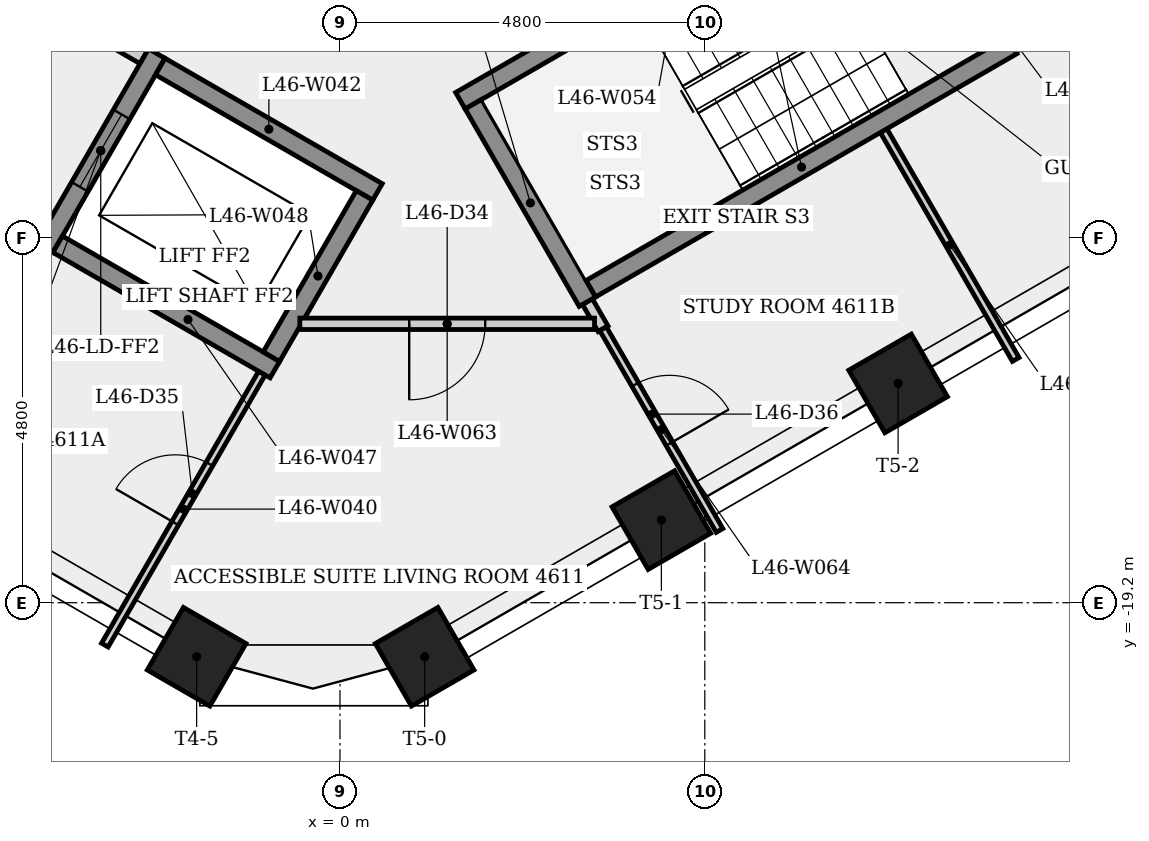
"""IFC4 building model, lengths in metres.
Left out: names, types, materials, properties, quantities, classifications, styles, units other than length and angle.
Written with IfcOpenShell. Run it as: python <this file> out.ifc"""

import sys

from ifc_helpers import new_model, si_unit, direction, frame, frame_2d, origin, origin_2d, place, context, subcontext, project, spatial, rectangle, extrude, element, fill, save


model = new_model("IFC4")
c1 = context("Model", 3, precision=1e-05, world=origin(), true_north=direction((0.0, 1.0)))
c2 = subcontext(c1, "Body", "Model", "MODEL_VIEW")
j1 = project(units=[si_unit("LENGTHUNIT", "METRE"), si_unit("PLANEANGLEUNIT", "RADIAN")], contexts=[c1])
p1 = place(None, origin())
s1 = spatial("IfcSite", under=j1, at=p1, CompositionType="ELEMENT")
p2 = place(p1, origin())
s2 = spatial("IfcBuilding", under=s1, at=p2, CompositionType="ELEMENT")
p3 = place(p2, frame((0.0, 0.0, 173.1)))
s3 = spatial("IfcBuildingStorey", under=s2, at=p3, CompositionType="ELEMENT", Elevation=173.1)
for number, where, z_axis, x_axis in (
    (1, (-1.886, -19.911, 0.0), (0.0, 0.0, 1.0), (-0.5, -0.866, 0.0)),
    (2, (1.114, -19.911, 0.0), (0.0, 0.0, 1.0), (0.5, -0.866, 0.0)),
    (3, (4.229, -18.113, 0.0), (0.0, 0.0, 1.0), (0.5, -0.866, 0.0)),
    (4, (7.343, -16.315, 0.0), (0.0, 0.0, 1.0), (0.5, -0.866, 0.0)),
):
    element("IfcColumn", number, at=place(p3, frame(where, z_axis=z_axis, x_axis=x_axis)), inside=s3, PredefinedType="COLUMN", context=c2, shape_type="SweptSolid", body=[
        extrude(rectangle(XDim=0.95, YDim=0.95, at=origin_2d()), origin(), (0.0, 0.0, 1.0), 3.4),
    ])
p4 = place(p3, frame((-6.435, -9.795, 0.0), z_axis=(0.0, 0.0, 1.0), x_axis=(0.866012907634, -0.500021643343, 0.0)))
e5 = element("IfcWall", 5, at=p4, inside=s3, PredefinedType="PARTITIONING", context=c2, shape_type="SweptSolid", body=[
    extrude(rectangle(XDim=4.45, YDim=0.2, at=frame_2d((2.225, 0.0))), origin(), (0.0, 0.0, 1.0), 3.05),
])
p5 = place(p4, frame((1.675, 0.0, 0.0)))
e6 = element("IfcOpeningElement", 6, at=p5, cuts=e5, PredefinedType="OPENING", context=c2, shape_type="SweptSolid", body=[
    extrude(rectangle(XDim=1.1, YDim=2.1, at=frame_2d((0.55, 1.05))), frame((0.0, 0.11, 0.0), z_axis=(0.0, -1.0, 0.0), x_axis=(1.0, 0.0, 0.0)), (0.0, 0.0, 1.0), 0.22),
])
p6 = place(p3, frame((-3.094, -19.758, 0.0), z_axis=(0.0, 0.0, 1.0), x_axis=(0.500027577057, 0.866009481578, 0.0)))
e7 = element("IfcWall", 7, at=p6, inside=s3, PredefinedType="PARTITIONING", context=c2, shape_type="SweptSolid", body=[
    extrude(rectangle(XDim=4.133, YDim=0.1, at=frame_2d((2.066, 0.0))), origin(), (0.0, 0.0, 1.0), 3.05),
])
p7 = place(p6, frame((1.852, 0.0, 0.0)))
e8 = element("IfcOpeningElement", 8, at=p7, cuts=e7, PredefinedType="OPENING", context=c2, shape_type="SweptSolid", body=[
    extrude(rectangle(XDim=0.9, YDim=2.1, at=frame_2d((0.45, 1.05))), frame((0.0, 0.06, 0.0), z_axis=(0.0, -1.0, 0.0), x_axis=(1.0, 0.0, 0.0)), (0.0, 0.0, 1.0), 0.12),
])
p8 = place(p3, frame((-2.41, -11.974, 0.0), z_axis=(0.0, 0.0, 1.0), x_axis=(-0.500001826776, -0.866024349092, 0.0)))
e9 = element("IfcWall", 9, at=p8, inside=s3, PredefinedType="SHEAR", context=c2, shape_type="SweptSolid", body=[
    extrude(rectangle(XDim=2.95, YDim=0.25, at=frame_2d((1.475, 0.0))), origin(), (0.0, 0.0, 1.0), 3.05),
])
p9 = place(p8, frame((0.925, 0.0, 0.0)))
e10 = element("IfcOpeningElement", 10, at=p9, cuts=e9, PredefinedType="OPENING", context=c2, shape_type="SweptSolid", body=[
    extrude(rectangle(XDim=1.1, YDim=2.1, at=frame_2d((0.55, 1.05))), frame((0.0, 0.135, 0.0), z_axis=(0.0, -1.0, 0.0), x_axis=(1.0, 0.0, 0.0)), (0.0, 0.0, 1.0), 0.27),
])
p10 = place(p3, frame((-2.364, -12.145, 0.0), z_axis=(0.0, 0.0, 1.0), x_axis=(0.866040211805, -0.499974350878, 0.0)))
e11 = element("IfcWall", 11, at=p10, inside=s3, PredefinedType="SHEAR", context=c2, shape_type="SweptSolid", body=[
    extrude(rectangle(XDim=3.3, YDim=0.25, at=frame_2d((1.65, 0.0))), origin(), (0.0, 0.0, 1.0), 3.05),
])
p11 = place(p3, frame((-0.856, -16.133, 0.0), z_axis=(0.0, 0.0, 1.0), x_axis=(-0.866021716278, 0.500006386895, 0.0)))
e12 = element("IfcWall", 12, at=p11, inside=s3, PredefinedType="SHEAR", context=c2, shape_type="SweptSolid", body=[
    extrude(rectangle(XDim=3.3, YDim=0.25, at=frame_2d((1.65, 0.0))), origin(), (0.0, 0.0, 1.0), 3.05),
])
p12 = place(p3, frame((-0.902, -15.962, 0.0), z_axis=(0.0, 0.0, 1.0), x_axis=(0.500061746146, 0.865989751695, 0.0)))
e13 = element("IfcWall", 13, at=p12, inside=s3, PredefinedType="SHEAR", context=c2, shape_type="SweptSolid", body=[
    extrude(rectangle(XDim=2.45, YDim=0.25, at=frame_2d((1.225, 0.0))), origin(), (0.0, 0.0, 1.0), 3.4),
])
p13 = place(p3, frame((1.585, -12.595, 0.0), z_axis=(0.0, 0.0, 1.0), x_axis=(0.866036417653, 0.499980922934, 0.0)))
e14 = element("IfcWall", 14, at=p13, inside=s3, PredefinedType="SHEAR", context=c2, shape_type="SweptSolid", body=[
    extrude(rectangle(XDim=6.65, YDim=0.25, at=frame_2d((3.325, 0.0))), origin(), (0.0, 0.0, 1.0), 3.05),
])
p14 = place(p13, frame((5.275, 0.0, 0.0)))
e15 = element("IfcOpeningElement", 15, at=p14, cuts=e14, PredefinedType="OPENING", context=c2, shape_type="SweptSolid", body=[
    extrude(rectangle(XDim=1.0, YDim=2.1, at=frame_2d((0.5, 1.05))), frame((0.0, 0.135, 0.0), z_axis=(0.0, -1.0, 0.0), x_axis=(1.0, 0.0, 0.0)), (0.0, 0.0, 1.0), 0.27),
])
p15 = place(p3, frame((3.256, -15.239, 0.0), z_axis=(0.0, 0.0, 1.0), x_axis=(0.500030520673, -0.866007781949, 0.0)))
e16 = element("IfcWall", 16, at=p15, inside=s3, PredefinedType="PARTITIONING", context=c2, shape_type="SweptSolid", body=[
    extrude(rectangle(XDim=0.412, YDim=0.15, at=frame_2d((0.206, 0.0))), origin(), (0.0, 0.0, 1.0), 3.05),
])
p16 = place(p3, frame((3.256, -15.239, 0.0), z_axis=(0.0, 0.0, 1.0), x_axis=(-0.50002537861, 0.866010750942, 0.0)))
e17 = element("IfcWall", 17, at=p16, inside=s3, PredefinedType="SHEAR", context=c2, shape_type="SweptSolid", body=[
    extrude(rectangle(XDim=3.0, YDim=0.25, at=frame_2d((1.5, 0.0))), origin(), (0.0, 0.0, 1.0), 3.05),
])
p17 = place(p3, frame((3.349, -15.53, 0.0), z_axis=(0.0, 0.0, 1.0), x_axis=(-1.0, 0.0, 0.0)))
e18 = element("IfcWall", 18, at=p17, inside=s3, PredefinedType="PARTITIONING", context=c2, shape_type="SweptSolid", body=[
    extrude(rectangle(XDim=3.876, YDim=0.15, at=frame_2d((1.938, 0.0))), origin(), (0.0, 0.0, 1.0), 3.05),
])
p18 = place(p17, frame((1.438, 0.0, 0.0)))
e19 = element("IfcOpeningElement", 19, at=p18, cuts=e18, PredefinedType="OPENING", context=c2, shape_type="SweptSolid", body=[
    extrude(rectangle(XDim=1.0, YDim=2.1, at=frame_2d((0.5, 1.05))), frame((0.0, 0.085, 0.0), z_axis=(0.0, -1.0, 0.0), x_axis=(1.0, 0.0, 0.0)), (0.0, 0.0, 1.0), 0.17),
])
p19 = place(p3, frame((3.461, -15.595, 0.0), z_axis=(0.0, 0.0, 1.0), x_axis=(0.50000286006, -0.866023752521, 0.0)))
e20 = element("IfcWall", 20, at=p19, inside=s3, PredefinedType="PARTITIONING", context=c2, shape_type="SweptSolid", body=[
    extrude(rectangle(XDim=3.065, YDim=0.1, at=frame_2d((1.532, 0.0))), origin(), (0.0, 0.0, 1.0), 3.05),
])
p20 = place(p19, frame((0.847, 0.0, 0.0)))
e21 = element("IfcOpeningElement", 21, at=p20, cuts=e20, PredefinedType="OPENING", context=c2, shape_type="SweptSolid", body=[
    extrude(rectangle(XDim=0.9, YDim=2.1, at=frame_2d((0.45, 1.05))), frame((0.0, 0.06, 0.0), z_axis=(0.0, -1.0, 0.0), x_axis=(1.0, 0.0, 0.0)), (0.0, 0.0, 1.0), 0.12),
])
p21 = place(p3, frame((7.153, -12.989, 0.0), z_axis=(0.0, 0.0, 1.0), x_axis=(0.500006134913, -0.866021861762, 0.0)))
e22 = element("IfcWall", 22, at=p21, inside=s3, PredefinedType="PARTITIONING", context=c2, shape_type="SweptSolid", body=[
    extrude(rectangle(XDim=3.477, YDim=0.1, at=frame_2d((1.738, 0.0))), origin(), (0.0, 0.0, 1.0), 3.05),
])
p22 = place(p3, frame((3.301, -15.068, 0.0), z_axis=(0.0, 0.0, 1.0), x_axis=(0.866035036182, 0.499983315828, 0.0)))
e23 = element("IfcWall", 23, at=p22, inside=s3, PredefinedType="SHEAR", context=c2, shape_type="SweptSolid", body=[
    extrude(rectangle(XDim=6.4, YDim=0.25, at=frame_2d((3.2, 0.0))), origin(), (0.0, 0.0, 1.0), 3.05),
])
p23 = place(p3, frame((10.901, -10.681, 0.0), z_axis=(0.0, 0.0, 1.0), x_axis=(-0.866007538022, -0.500030943131, 0.0)))
e24 = element("IfcWall", 24, at=p23, inside=s3, PredefinedType="PARTITIONING", context=c2, shape_type="SweptSolid", body=[
    extrude(rectangle(XDim=2.375, YDim=0.2, at=frame_2d((1.188, 0.0))), origin(), (0.0, 0.0, 1.0), 3.05),
])
p24 = place(p9, origin())
e25 = element("IfcDoor", 25, at=p24, inside=s3, OperationType="SLIDING_TO_LEFT", PredefinedType="DOOR", context=c2, shape_type="SweptSolid", body=[
    extrude(rectangle(XDim=1.1, YDim=2.1, at=frame_2d((0.55, 1.05))), frame((0.0, 0.025, 0.0), z_axis=(0.0, -1.0, 0.0), x_axis=(1.0, 0.0, 0.0)), (0.0, 0.0, 1.0), 0.05),
])
fill(e10, e25)
p25 = place(p18, origin())
e26 = element("IfcDoor", 26, at=p25, inside=s3, OperationType="SINGLE_SWING_RIGHT", PredefinedType="DOOR", context=c2, shape_type="SweptSolid", body=[
    extrude(rectangle(XDim=1.0, YDim=2.1, at=frame_2d((0.5, 1.05))), frame((0.0, 0.025, 0.0), z_axis=(0.0, -1.0, 0.0), x_axis=(1.0, 0.0, 0.0)), (0.0, 0.0, 1.0), 0.05),
])
fill(e19, e26)
p26 = place(p7, origin())
e27 = element("IfcDoor", 27, at=p26, inside=s3, OperationType="SINGLE_SWING_LEFT", PredefinedType="DOOR", context=c2, shape_type="SweptSolid", body=[
    extrude(rectangle(XDim=0.9, YDim=2.1, at=frame_2d((0.45, 1.05))), frame((0.0, 0.025, 0.0), z_axis=(0.0, -1.0, 0.0), x_axis=(1.0, 0.0, 0.0)), (0.0, 0.0, 1.0), 0.05),
])
fill(e8, e27)
p27 = place(p20, origin())
e28 = element("IfcDoor", 28, at=p27, inside=s3, OperationType="SINGLE_SWING_RIGHT", PredefinedType="DOOR", context=c2, shape_type="SweptSolid", body=[
    extrude(rectangle(XDim=0.9, YDim=2.1, at=frame_2d((0.45, 1.05))), frame((0.0, 0.025, 0.0), z_axis=(0.0, -1.0, 0.0), x_axis=(1.0, 0.0, 0.0)), (0.0, 0.0, 1.0), 0.05),
])
fill(e21, e28)
save(model, sys.argv[1])
